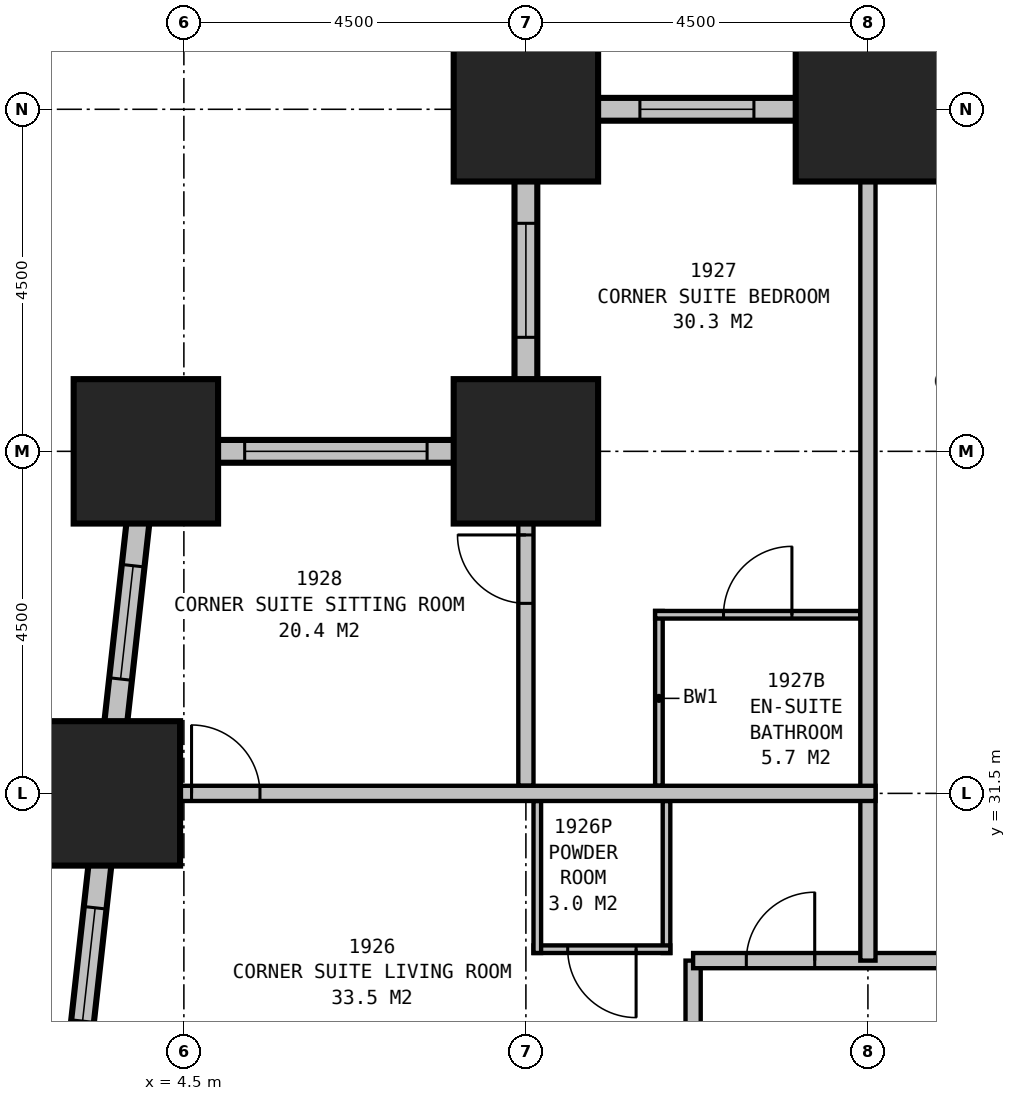
"""IFC4 building model, lengths in metres.
Left out: names, types, materials, properties, quantities, classifications, styles, units other than length and angle.
Written with IfcOpenShell. Run it as: python <this file> out.ifc"""

import sys

from ifc_helpers import new_model, si_unit, direction, frame, frame_2d, origin, origin_2d, place, context, subcontext, project, spatial, rectangle, extrude, element, fill, save


model = new_model("IFC4")
c1 = context("Model", 3, precision=1e-05, world=origin(), true_north=direction((0.0, 1.0)))
c2 = subcontext(c1, "Body", "Model", "MODEL_VIEW")
j1 = project(units=[si_unit("LENGTHUNIT", "METRE"), si_unit("PLANEANGLEUNIT", "RADIAN")], contexts=[c1])
p1 = place(None, origin())
s1 = spatial("IfcSite", under=j1, at=p1, CompositionType="ELEMENT")
p2 = place(p1, origin())
s2 = spatial("IfcBuilding", under=s1, at=p2, CompositionType="ELEMENT")
p3 = place(p2, frame((0.0, 0.0, 78.7)))
s3 = spatial("IfcBuildingStorey", under=s2, at=p3, CompositionType="ELEMENT", Elevation=78.7)
for number, where, z_axis, x_axis in (
    (1, (13.5, 40.5, 0.0), (0.0, 0.0, 1.0), (1.0, 0.0, 0.0)),
    (2, (9.0, 40.5, 0.0), (0.0, 0.0, 1.0), (1.0, 0.0, 0.0)),
    (3, (9.0, 36.0, 0.0), (0.0, 0.0, 1.0), (1.0, 0.0, 0.0)),
    (4, (4.0, 36.0, 0.0), (0.0, 0.0, 1.0), (1.0, 0.0, 0.0)),
    (5, (3.5, 31.5, 0.0), (0.0, 0.0, 1.0), (1.0, 0.0, 0.0)),
):
    element("IfcColumn", number, at=place(p3, frame(where, z_axis=z_axis, x_axis=x_axis)), inside=s3, PredefinedType="COLUMN", context=c2, shape_type="SweptSolid", body=[
        extrude(rectangle(XDim=1.9, YDim=1.9, at=origin_2d()), origin(), (0.0, 0.0, 1.0), 3.5),
    ])
p4 = place(p3, frame((40.65, 40.5, 0.0), z_axis=(0.0, 0.0, 1.0), x_axis=(-1.0, 0.0, 0.0)))
e6 = element("IfcWall", 6, at=p4, inside=s3, PredefinedType="STANDARD", context=c2, shape_type="SweptSolid", body=[
    extrude(rectangle(XDim=31.8, YDim=0.3, at=frame_2d((15.9, 0.0))), origin(), (0.0, 0.0, 1.0), 2.05),
])
p5 = place(p4, frame((1.65, 0.0, 0.5)))
e7 = element("IfcOpeningElement", 7, at=p5, cuts=e6, PredefinedType="OPENING", context=c2, shape_type="SweptSolid", body=[
    extrude(rectangle(XDim=1.5, YDim=1.4, at=frame_2d((0.75, 0.7))), frame((0.0, 0.16, 0.0), z_axis=(0.0, -1.0, 0.0), x_axis=(1.0, 0.0, 0.0)), (0.0, 0.0, 1.0), 0.32),
])
p6 = place(p4, frame((6.15, 0.0, 0.5)))
e8 = element("IfcOpeningElement", 8, at=p6, cuts=e6, PredefinedType="OPENING", context=c2, shape_type="SweptSolid", body=[
    extrude(rectangle(XDim=1.5, YDim=1.4, at=frame_2d((0.75, 0.7))), frame((0.0, 0.16, 0.0), z_axis=(0.0, -1.0, 0.0), x_axis=(1.0, 0.0, 0.0)), (0.0, 0.0, 1.0), 0.32),
])
p7 = place(p4, frame((10.65, 0.0, 0.5)))
e9 = element("IfcOpeningElement", 9, at=p7, cuts=e6, PredefinedType="OPENING", context=c2, shape_type="SweptSolid", body=[
    extrude(rectangle(XDim=1.5, YDim=1.4, at=frame_2d((0.75, 0.7))), frame((0.0, 0.16, 0.0), z_axis=(0.0, -1.0, 0.0), x_axis=(1.0, 0.0, 0.0)), (0.0, 0.0, 1.0), 0.32),
])
p8 = place(p4, frame((15.15, 0.0, 0.5)))
e10 = element("IfcOpeningElement", 10, at=p8, cuts=e6, PredefinedType="OPENING", context=c2, shape_type="SweptSolid", body=[
    extrude(rectangle(XDim=1.5, YDim=1.4, at=frame_2d((0.75, 0.7))), frame((0.0, 0.16, 0.0), z_axis=(0.0, -1.0, 0.0), x_axis=(1.0, 0.0, 0.0)), (0.0, 0.0, 1.0), 0.32),
])
p9 = place(p4, frame((19.65, 0.0, 0.5)))
e11 = element("IfcOpeningElement", 11, at=p9, cuts=e6, PredefinedType="OPENING", context=c2, shape_type="SweptSolid", body=[
    extrude(rectangle(XDim=1.5, YDim=1.4, at=frame_2d((0.75, 0.7))), frame((0.0, 0.16, 0.0), z_axis=(0.0, -1.0, 0.0), x_axis=(1.0, 0.0, 0.0)), (0.0, 0.0, 1.0), 0.32),
])
p10 = place(p4, frame((24.15, 0.0, 0.5)))
e12 = element("IfcOpeningElement", 12, at=p10, cuts=e6, PredefinedType="OPENING", context=c2, shape_type="SweptSolid", body=[
    extrude(rectangle(XDim=1.5, YDim=1.4, at=frame_2d((0.75, 0.7))), frame((0.0, 0.16, 0.0), z_axis=(0.0, -1.0, 0.0), x_axis=(1.0, 0.0, 0.0)), (0.0, 0.0, 1.0), 0.32),
])
p11 = place(p4, frame((28.65, 0.0, 0.5)))
e13 = element("IfcOpeningElement", 13, at=p11, cuts=e6, PredefinedType="OPENING", context=c2, shape_type="SweptSolid", body=[
    extrude(rectangle(XDim=1.5, YDim=1.4, at=frame_2d((0.75, 0.7))), frame((0.0, 0.16, 0.0), z_axis=(0.0, -1.0, 0.0), x_axis=(1.0, 0.0, 0.0)), (0.0, 0.0, 1.0), 0.32),
])
p12 = place(p3, frame((9.0, 40.65, 0.0), z_axis=(0.0, 0.0, 1.0), x_axis=(0.0, -1.0, 0.0)))
e14 = element("IfcWall", 14, at=p12, inside=s3, PredefinedType="STANDARD", context=c2, shape_type="SweptSolid", body=[
    extrude(rectangle(XDim=4.8, YDim=0.3, at=frame_2d((2.4, 0.0))), origin(), (0.0, 0.0, 1.0), 2.05),
])
p13 = place(p12, frame((1.65, 0.0, 0.5)))
e15 = element("IfcOpeningElement", 15, at=p13, cuts=e14, PredefinedType="OPENING", context=c2, shape_type="SweptSolid", body=[
    extrude(rectangle(XDim=1.5, YDim=1.4, at=frame_2d((0.75, 0.7))), frame((0.0, 0.16, 0.0), z_axis=(0.0, -1.0, 0.0), x_axis=(1.0, 0.0, 0.0)), (0.0, 0.0, 1.0), 0.32),
])
p14 = place(p3, frame((9.15, 36.0, 0.0), z_axis=(0.0, 0.0, 1.0), x_axis=(-1.0, 0.0, 0.0)))
e16 = element("IfcWall", 16, at=p14, inside=s3, PredefinedType="STANDARD", context=c2, shape_type="SweptSolid", body=[
    extrude(rectangle(XDim=5.3, YDim=0.3, at=frame_2d((2.65, 0.0))), origin(), (0.0, 0.0, 1.0), 2.05),
])
p15 = place(p14, frame((1.45, 0.0, 0.5)))
e17 = element("IfcOpeningElement", 17, at=p15, cuts=e16, PredefinedType="OPENING", context=c2, shape_type="SweptSolid", body=[
    extrude(rectangle(XDim=2.4, YDim=1.4, at=frame_2d((1.2, 0.7))), frame((0.0, 0.16, 0.0), z_axis=(0.0, -1.0, 0.0), x_axis=(1.0, 0.0, 0.0)), (0.0, 0.0, 1.0), 0.32),
])
p16 = place(p3, frame((4.017, 36.149, 0.0), z_axis=(0.0, 0.0, 1.0), x_axis=(-0.110433201132, -0.993883548555, 0.0)))
e18 = element("IfcWall", 18, at=p16, inside=s3, PredefinedType="STANDARD", context=c2, shape_type="SweptSolid", body=[
    extrude(rectangle(XDim=31.994, YDim=0.3, at=frame_2d((15.997, 0.0))), origin(), (0.0, 0.0, 1.0), 2.05),
])
p17 = place(p16, frame((1.664, 0.0, 0.5)))
e19 = element("IfcOpeningElement", 19, at=p17, cuts=e18, PredefinedType="OPENING", context=c2, shape_type="SweptSolid", body=[
    extrude(rectangle(XDim=1.5, YDim=1.4, at=frame_2d((0.75, 0.7))), frame((0.0, 0.16, 0.0), z_axis=(0.0, -1.0, 0.0), x_axis=(1.0, 0.0, 0.0)), (0.0, 0.0, 1.0), 0.32),
])
p18 = place(p16, frame((6.192, 0.0, 0.5)))
e20 = element("IfcOpeningElement", 20, at=p18, cuts=e18, PredefinedType="OPENING", context=c2, shape_type="SweptSolid", body=[
    extrude(rectangle(XDim=1.5, YDim=1.4, at=frame_2d((0.75, 0.7))), frame((0.0, 0.16, 0.0), z_axis=(0.0, -1.0, 0.0), x_axis=(1.0, 0.0, 0.0)), (0.0, 0.0, 1.0), 0.32),
])
p19 = place(p16, frame((10.719, 0.0, 0.5)))
e21 = element("IfcOpeningElement", 21, at=p19, cuts=e18, PredefinedType="OPENING", context=c2, shape_type="SweptSolid", body=[
    extrude(rectangle(XDim=1.5, YDim=1.4, at=frame_2d((0.75, 0.7))), frame((0.0, 0.16, 0.0), z_axis=(0.0, -1.0, 0.0), x_axis=(1.0, 0.0, 0.0)), (0.0, 0.0, 1.0), 0.32),
])
p20 = place(p16, frame((15.247, 0.0, 0.5)))
e22 = element("IfcOpeningElement", 22, at=p20, cuts=e18, PredefinedType="OPENING", context=c2, shape_type="SweptSolid", body=[
    extrude(rectangle(XDim=1.5, YDim=1.4, at=frame_2d((0.75, 0.7))), frame((0.0, 0.16, 0.0), z_axis=(0.0, -1.0, 0.0), x_axis=(1.0, 0.0, 0.0)), (0.0, 0.0, 1.0), 0.32),
])
p21 = place(p16, frame((19.775, 0.0, 0.5)))
e23 = element("IfcOpeningElement", 23, at=p21, cuts=e18, PredefinedType="OPENING", context=c2, shape_type="SweptSolid", body=[
    extrude(rectangle(XDim=1.5, YDim=1.4, at=frame_2d((0.75, 0.7))), frame((0.0, 0.16, 0.0), z_axis=(0.0, -1.0, 0.0), x_axis=(1.0, 0.0, 0.0)), (0.0, 0.0, 1.0), 0.32),
])
p22 = place(p16, frame((24.302, 0.0, 0.5)))
e24 = element("IfcOpeningElement", 24, at=p22, cuts=e18, PredefinedType="OPENING", context=c2, shape_type="SweptSolid", body=[
    extrude(rectangle(XDim=1.5, YDim=1.4, at=frame_2d((0.75, 0.7))), frame((0.0, 0.16, 0.0), z_axis=(0.0, -1.0, 0.0), x_axis=(1.0, 0.0, 0.0)), (0.0, 0.0, 1.0), 0.32),
])
p23 = place(p16, frame((28.83, 0.0, 0.5)))
e25 = element("IfcOpeningElement", 25, at=p23, cuts=e18, PredefinedType="OPENING", context=c2, shape_type="SweptSolid", body=[
    extrude(rectangle(XDim=1.5, YDim=1.4, at=frame_2d((0.75, 0.7))), frame((0.0, 0.16, 0.0), z_axis=(0.0, -1.0, 0.0), x_axis=(1.0, 0.0, 0.0)), (0.0, 0.0, 1.0), 0.32),
])
p24 = place(p3, frame((11.2, 29.3, 0.0), z_axis=(0.0, 0.0, 1.0), x_axis=(1.0, 0.0, 0.0)))
e26 = element("IfcWall", 26, at=p24, inside=s3, PredefinedType="PARTITIONING", context=c2, shape_type="SweptSolid", body=[
    extrude(rectangle(XDim=27.1, YDim=0.2, at=frame_2d((13.55, 0.0))), origin(), (0.0, 0.0, 1.0), 3.25),
])
p25 = place(p24, frame((4.2, 0.0, 0.0)))
e27 = element("IfcOpeningElement", 27, at=p25, cuts=e26, PredefinedType="OPENING", context=c2, shape_type="SweptSolid", body=[
    extrude(rectangle(XDim=0.9, YDim=2.1, at=frame_2d((0.45, 1.05))), frame((0.0, 0.11, 0.0), z_axis=(0.0, -1.0, 0.0), x_axis=(1.0, 0.0, 0.0)), (0.0, 0.0, 1.0), 0.22),
])
p26 = place(p24, frame((8.7, 0.0, 0.0)))
e28 = element("IfcOpeningElement", 28, at=p26, cuts=e26, PredefinedType="OPENING", context=c2, shape_type="SweptSolid", body=[
    extrude(rectangle(XDim=0.9, YDim=2.1, at=frame_2d((0.45, 1.05))), frame((0.0, 0.11, 0.0), z_axis=(0.0, -1.0, 0.0), x_axis=(1.0, 0.0, 0.0)), (0.0, 0.0, 1.0), 0.22),
])
p27 = place(p24, frame((13.2, 0.0, 0.0)))
e29 = element("IfcOpeningElement", 29, at=p27, cuts=e26, PredefinedType="OPENING", context=c2, shape_type="SweptSolid", body=[
    extrude(rectangle(XDim=0.9, YDim=2.1, at=frame_2d((0.45, 1.05))), frame((0.0, 0.11, 0.0), z_axis=(0.0, -1.0, 0.0), x_axis=(1.0, 0.0, 0.0)), (0.0, 0.0, 1.0), 0.22),
])
p28 = place(p24, frame((17.55, 0.0, 0.0)))
e30 = element("IfcOpeningElement", 30, at=p28, cuts=e26, PredefinedType="OPENING", context=c2, shape_type="SweptSolid", body=[
    extrude(rectangle(XDim=0.9, YDim=2.1, at=frame_2d((0.45, 1.05))), frame((0.0, 0.11, 0.0), z_axis=(0.0, -1.0, 0.0), x_axis=(1.0, 0.0, 0.0)), (0.0, 0.0, 1.0), 0.22),
])
p29 = place(p24, frame((23.1, 0.0, 0.0)))
e31 = element("IfcOpeningElement", 31, at=p29, cuts=e26, PredefinedType="OPENING", context=c2, shape_type="SweptSolid", body=[
    extrude(rectangle(XDim=1.0, YDim=2.1, at=frame_2d((0.5, 1.05))), frame((0.0, 0.11, 0.0), z_axis=(0.0, -1.0, 0.0), x_axis=(1.0, 0.0, 0.0)), (0.0, 0.0, 1.0), 0.22),
])
p30 = place(p24, frame((25.5, 0.0, 0.0)))
e32 = element("IfcOpeningElement", 32, at=p30, cuts=e26, PredefinedType="OPENING", context=c2, shape_type="SweptSolid", body=[
    extrude(rectangle(XDim=0.9, YDim=2.1, at=frame_2d((0.45, 1.05))), frame((0.0, 0.11, 0.0), z_axis=(0.0, -1.0, 0.0), x_axis=(1.0, 0.0, 0.0)), (0.0, 0.0, 1.0), 0.22),
])
p31 = place(p24, frame((0.7, 0.0, 0.0)))
e33 = element("IfcOpeningElement", 33, at=p31, cuts=e26, PredefinedType="OPENING", context=c2, shape_type="SweptSolid", body=[
    extrude(rectangle(XDim=0.9, YDim=2.1, at=frame_2d((0.45, 1.05))), frame((0.0, 0.11, 0.0), z_axis=(0.0, -1.0, 0.0), x_axis=(1.0, 0.0, 0.0)), (0.0, 0.0, 1.0), 0.22),
])
p32 = place(p3, frame((11.2, 10.6, 0.0), z_axis=(0.0, 0.0, 1.0), x_axis=(0.0, 1.0, 0.0)))
e34 = element("IfcWall", 34, at=p32, inside=s3, PredefinedType="PARTITIONING", context=c2, shape_type="SweptSolid", body=[
    extrude(rectangle(XDim=18.7, YDim=0.2, at=frame_2d((9.35, 0.0))), origin(), (0.0, 0.0, 1.0), 3.25),
])
p33 = place(p32, frame((4.75, 0.0, 0.0)))
e35 = element("IfcOpeningElement", 35, at=p33, cuts=e34, PredefinedType="OPENING", context=c2, shape_type="SweptSolid", body=[
    extrude(rectangle(XDim=0.9, YDim=2.1, at=frame_2d((0.45, 1.05))), frame((0.0, 0.11, 0.0), z_axis=(0.0, -1.0, 0.0), x_axis=(1.0, 0.0, 0.0)), (0.0, 0.0, 1.0), 0.22),
])
p34 = place(p32, frame((14.65, 0.0, 0.0)))
e36 = element("IfcOpeningElement", 36, at=p34, cuts=e34, PredefinedType="OPENING", context=c2, shape_type="SweptSolid", body=[
    extrude(rectangle(XDim=1.0, YDim=2.1, at=frame_2d((0.5, 1.05))), frame((0.0, 0.11, 0.0), z_axis=(0.0, -1.0, 0.0), x_axis=(1.0, 0.0, 0.0)), (0.0, 0.0, 1.0), 0.22),
])
p35 = place(p3, frame((13.5, 29.3, 0.0), z_axis=(0.0, 0.0, 1.0), x_axis=(0.0, 1.0, 0.0)))
e37 = element("IfcWall", 37, at=p35, inside=s3, PredefinedType="PARTITIONING", context=c2, shape_type="SweptSolid", body=[
    extrude(rectangle(XDim=11.2, YDim=0.2, at=frame_2d((5.6, 0.0))), origin(), (0.0, 0.0, 1.0), 2.25),
])
p36 = place(p3, frame((13.6, 31.5, 0.0), z_axis=(0.0, 0.0, 1.0), x_axis=(-1.0, 0.0, 0.0)))
e38 = element("IfcWall", 38, at=p36, inside=s3, PredefinedType="PARTITIONING", context=c2, shape_type="SweptSolid", body=[
    extrude(rectangle(XDim=10.099, YDim=0.2, at=frame_2d((5.05, 0.0))), origin(), (0.0, 0.0, 1.0), 3.25),
])
p37 = place(p36, frame((8.999, 0.0, 0.0), z_axis=(0.0, 0.0, 1.0), x_axis=(-1.0, 0.0, 0.0)))
e39 = element("IfcOpeningElement", 39, at=p37, cuts=e38, PredefinedType="OPENING", context=c2, shape_type="SweptSolid", body=[
    extrude(rectangle(XDim=0.9, YDim=2.1, at=frame_2d((0.45, 1.05))), frame((0.0, 0.11, 0.0), z_axis=(0.0, -1.0, 0.0), x_axis=(1.0, 0.0, 0.0)), (0.0, 0.0, 1.0), 0.22),
])
p38 = place(p3, frame((9.15, 31.4, 0.0), z_axis=(0.0, 0.0, 1.0), x_axis=(0.0, -1.0, 0.0)))
e40 = element("IfcWall", 40, at=p38, inside=s3, PredefinedType="PLUMBINGWALL", context=c2, shape_type="SweptSolid", body=[
    extrude(rectangle(XDim=2.0, YDim=0.1, at=frame_2d((1.0, 0.0))), origin(), (0.0, 0.0, 1.0), 2.25),
])
p39 = place(p3, frame((10.85, 31.4, 0.0), z_axis=(0.0, 0.0, 1.0), x_axis=(0.0, -1.0, 0.0)))
e41 = element("IfcWall", 41, at=p39, inside=s3, PredefinedType="PLUMBINGWALL", context=c2, shape_type="SweptSolid", body=[
    extrude(rectangle(XDim=2.0, YDim=0.1, at=frame_2d((1.0, 0.0))), origin(), (0.0, 0.0, 1.0), 3.25),
])
p40 = place(p3, frame((10.9, 29.45, 0.0), z_axis=(0.0, 0.0, 1.0), x_axis=(-1.0, 0.0, 0.0)))
e42 = element("IfcWall", 42, at=p40, inside=s3, PredefinedType="PLUMBINGWALL", context=c2, shape_type="SweptSolid", body=[
    extrude(rectangle(XDim=1.8, YDim=0.1, at=frame_2d((0.9, 0.0))), origin(), (0.0, 0.0, 1.0), 3.25),
])
p41 = place(p40, frame((0.45, 0.0, 0.0)))
e43 = element("IfcOpeningElement", 43, at=p41, cuts=e42, PredefinedType="OPENING", context=c2, shape_type="SweptSolid", body=[
    extrude(rectangle(XDim=0.9, YDim=2.1, at=frame_2d((0.45, 1.05))), frame((0.0, 0.06, 0.0), z_axis=(0.0, -1.0, 0.0), x_axis=(1.0, 0.0, 0.0)), (0.0, 0.0, 1.0), 0.12),
])
p42 = place(p3, frame((9.0, 31.6, 0.0), z_axis=(0.0, 0.0, 1.0), x_axis=(0.0, 1.0, 0.0)))
e44 = element("IfcWall", 44, at=p42, inside=s3, PredefinedType="PARTITIONING", context=c2, shape_type="SweptSolid", body=[
    extrude(rectangle(XDim=4.4, YDim=0.2, at=frame_2d((2.2, 0.0))), origin(), (0.0, 0.0, 1.0), 2.25),
])
p43 = place(p42, frame((2.4, 0.0, 0.0)))
e45 = element("IfcOpeningElement", 45, at=p43, cuts=e44, PredefinedType="OPENING", context=c2, shape_type="SweptSolid", body=[
    extrude(rectangle(XDim=0.9, YDim=2.1, at=frame_2d((0.45, 1.05))), frame((0.0, 0.11, 0.0), z_axis=(0.0, -1.0, 0.0), x_axis=(1.0, 0.0, 0.0)), (0.0, 0.0, 1.0), 0.22),
])
p44 = place(p3, frame((10.75, 31.6, 0.0), z_axis=(0.0, 0.0, 1.0), x_axis=(0.0, 1.0, 0.0)))
e46 = element("IfcWall", 46, at=p44, inside=s3, PredefinedType="PLUMBINGWALL", context=c2, shape_type="SweptSolid", body=[
    extrude(rectangle(XDim=2.3, YDim=0.1, at=frame_2d((1.15, 0.0))), origin(), (0.0, 0.0, 1.0), 3.25),
])
p45 = place(p3, frame((13.4, 33.85, 0.0), z_axis=(0.0, 0.0, 1.0), x_axis=(-1.0, 0.0, 0.0)))
e47 = element("IfcWall", 47, at=p45, inside=s3, PredefinedType="PLUMBINGWALL", context=c2, shape_type="SweptSolid", body=[
    extrude(rectangle(XDim=2.7, YDim=0.1, at=frame_2d((1.35, 0.0))), origin(), (0.0, 0.0, 1.0), 3.25),
])
p46 = place(p45, frame((1.8, 0.0, 0.0), z_axis=(0.0, 0.0, 1.0), x_axis=(-1.0, 0.0, 0.0)))
e48 = element("IfcOpeningElement", 48, at=p46, cuts=e47, PredefinedType="OPENING", context=c2, shape_type="SweptSolid", body=[
    extrude(rectangle(XDim=0.9, YDim=2.1, at=frame_2d((0.45, 1.05))), frame((0.0, 0.06, 0.0), z_axis=(0.0, -1.0, 0.0), x_axis=(1.0, 0.0, 0.0)), (0.0, 0.0, 1.0), 0.12),
])
p47 = place(p11, origin())
e49 = element("IfcWindow", 49, at=p47, inside=s3, PartitioningType="SINGLE_PANEL", PredefinedType="WINDOW", context=c2, shape_type="SweptSolid", body=[
    extrude(rectangle(XDim=1.5, YDim=1.4, at=frame_2d((0.75, 0.7))), frame((0.0, 0.03, 0.0), z_axis=(0.0, -1.0, 0.0), x_axis=(1.0, 0.0, 0.0)), (0.0, 0.0, 1.0), 0.06),
])
fill(e13, e49)
p48 = place(p13, origin())
e50 = element("IfcWindow", 50, at=p48, inside=s3, PartitioningType="SINGLE_PANEL", PredefinedType="WINDOW", context=c2, shape_type="SweptSolid", body=[
    extrude(rectangle(XDim=1.5, YDim=1.4, at=frame_2d((0.75, 0.7))), frame((0.0, 0.03, 0.0), z_axis=(0.0, -1.0, 0.0), x_axis=(1.0, 0.0, 0.0)), (0.0, 0.0, 1.0), 0.06),
])
fill(e15, e50)
p49 = place(p15, origin())
e51 = element("IfcWindow", 51, at=p49, inside=s3, PartitioningType="SINGLE_PANEL", PredefinedType="WINDOW", context=c2, shape_type="SweptSolid", body=[
    extrude(rectangle(XDim=2.4, YDim=1.4, at=frame_2d((1.2, 0.7))), frame((0.0, 0.03, 0.0), z_axis=(0.0, -1.0, 0.0), x_axis=(1.0, 0.0, 0.0)), (0.0, 0.0, 1.0), 0.06),
])
fill(e17, e51)
p50 = place(p17, origin())
e52 = element("IfcWindow", 52, at=p50, inside=s3, PartitioningType="SINGLE_PANEL", PredefinedType="WINDOW", context=c2, shape_type="SweptSolid", body=[
    extrude(rectangle(XDim=1.5, YDim=1.4, at=frame_2d((0.75, 0.7))), frame((0.0, 0.03, 0.0), z_axis=(0.0, -1.0, 0.0), x_axis=(1.0, 0.0, 0.0)), (0.0, 0.0, 1.0), 0.06),
])
fill(e19, e52)
p51 = place(p18, origin())
e53 = element("IfcWindow", 53, at=p51, inside=s3, PartitioningType="SINGLE_PANEL", PredefinedType="WINDOW", context=c2, shape_type="SweptSolid", body=[
    extrude(rectangle(XDim=1.5, YDim=1.4, at=frame_2d((0.75, 0.7))), frame((0.0, 0.03, 0.0), z_axis=(0.0, -1.0, 0.0), x_axis=(1.0, 0.0, 0.0)), (0.0, 0.0, 1.0), 0.06),
])
fill(e20, e53)
p52 = place(p31, origin())
e54 = element("IfcDoor", 54, at=p52, inside=s3, OperationType="SINGLE_SWING_RIGHT", PredefinedType="DOOR", context=c2, shape_type="SweptSolid", body=[
    extrude(rectangle(XDim=0.9, YDim=2.1, at=frame_2d((0.45, 1.05))), frame((0.0, 0.025, 0.0), z_axis=(0.0, -1.0, 0.0), x_axis=(1.0, 0.0, 0.0)), (0.0, 0.0, 1.0), 0.05),
])
fill(e33, e54)
p53 = place(p37, origin())
e55 = element("IfcDoor", 55, at=p53, inside=s3, OperationType="SINGLE_SWING_LEFT", PredefinedType="DOOR", context=c2, shape_type="SweptSolid", body=[
    extrude(rectangle(XDim=0.9, YDim=2.1, at=frame_2d((0.45, 1.05))), frame((0.0, 0.025, 0.0), z_axis=(0.0, -1.0, 0.0), x_axis=(1.0, 0.0, 0.0)), (0.0, 0.0, 1.0), 0.05),
])
fill(e39, e55)
p54 = place(p41, origin())
e56 = element("IfcDoor", 56, at=p54, inside=s3, OperationType="SINGLE_SWING_LEFT", PredefinedType="DOOR", context=c2, shape_type="SweptSolid", body=[
    extrude(rectangle(XDim=0.9, YDim=2.1, at=frame_2d((0.45, 1.05))), frame((0.0, 0.025, 0.0), z_axis=(0.0, -1.0, 0.0), x_axis=(1.0, 0.0, 0.0)), (0.0, 0.0, 1.0), 0.05),
])
fill(e43, e56)
p55 = place(p43, origin())
e57 = element("IfcDoor", 57, at=p55, inside=s3, OperationType="SINGLE_SWING_RIGHT", PredefinedType="DOOR", context=c2, shape_type="SweptSolid", body=[
    extrude(rectangle(XDim=0.9, YDim=2.1, at=frame_2d((0.45, 1.05))), frame((0.0, 0.025, 0.0), z_axis=(0.0, -1.0, 0.0), x_axis=(1.0, 0.0, 0.0)), (0.0, 0.0, 1.0), 0.05),
])
fill(e45, e57)
p56 = place(p46, origin())
e58 = element("IfcDoor", 58, at=p56, inside=s3, OperationType="SINGLE_SWING_RIGHT", PredefinedType="DOOR", context=c2, shape_type="SweptSolid", body=[
    extrude(rectangle(XDim=0.9, YDim=2.1, at=frame_2d((0.45, 1.05))), frame((0.0, 0.025, 0.0), z_axis=(0.0, -1.0, 0.0), x_axis=(1.0, 0.0, 0.0)), (0.0, 0.0, 1.0), 0.05),
])
fill(e48, e58)
save(model, sys.argv[1])
